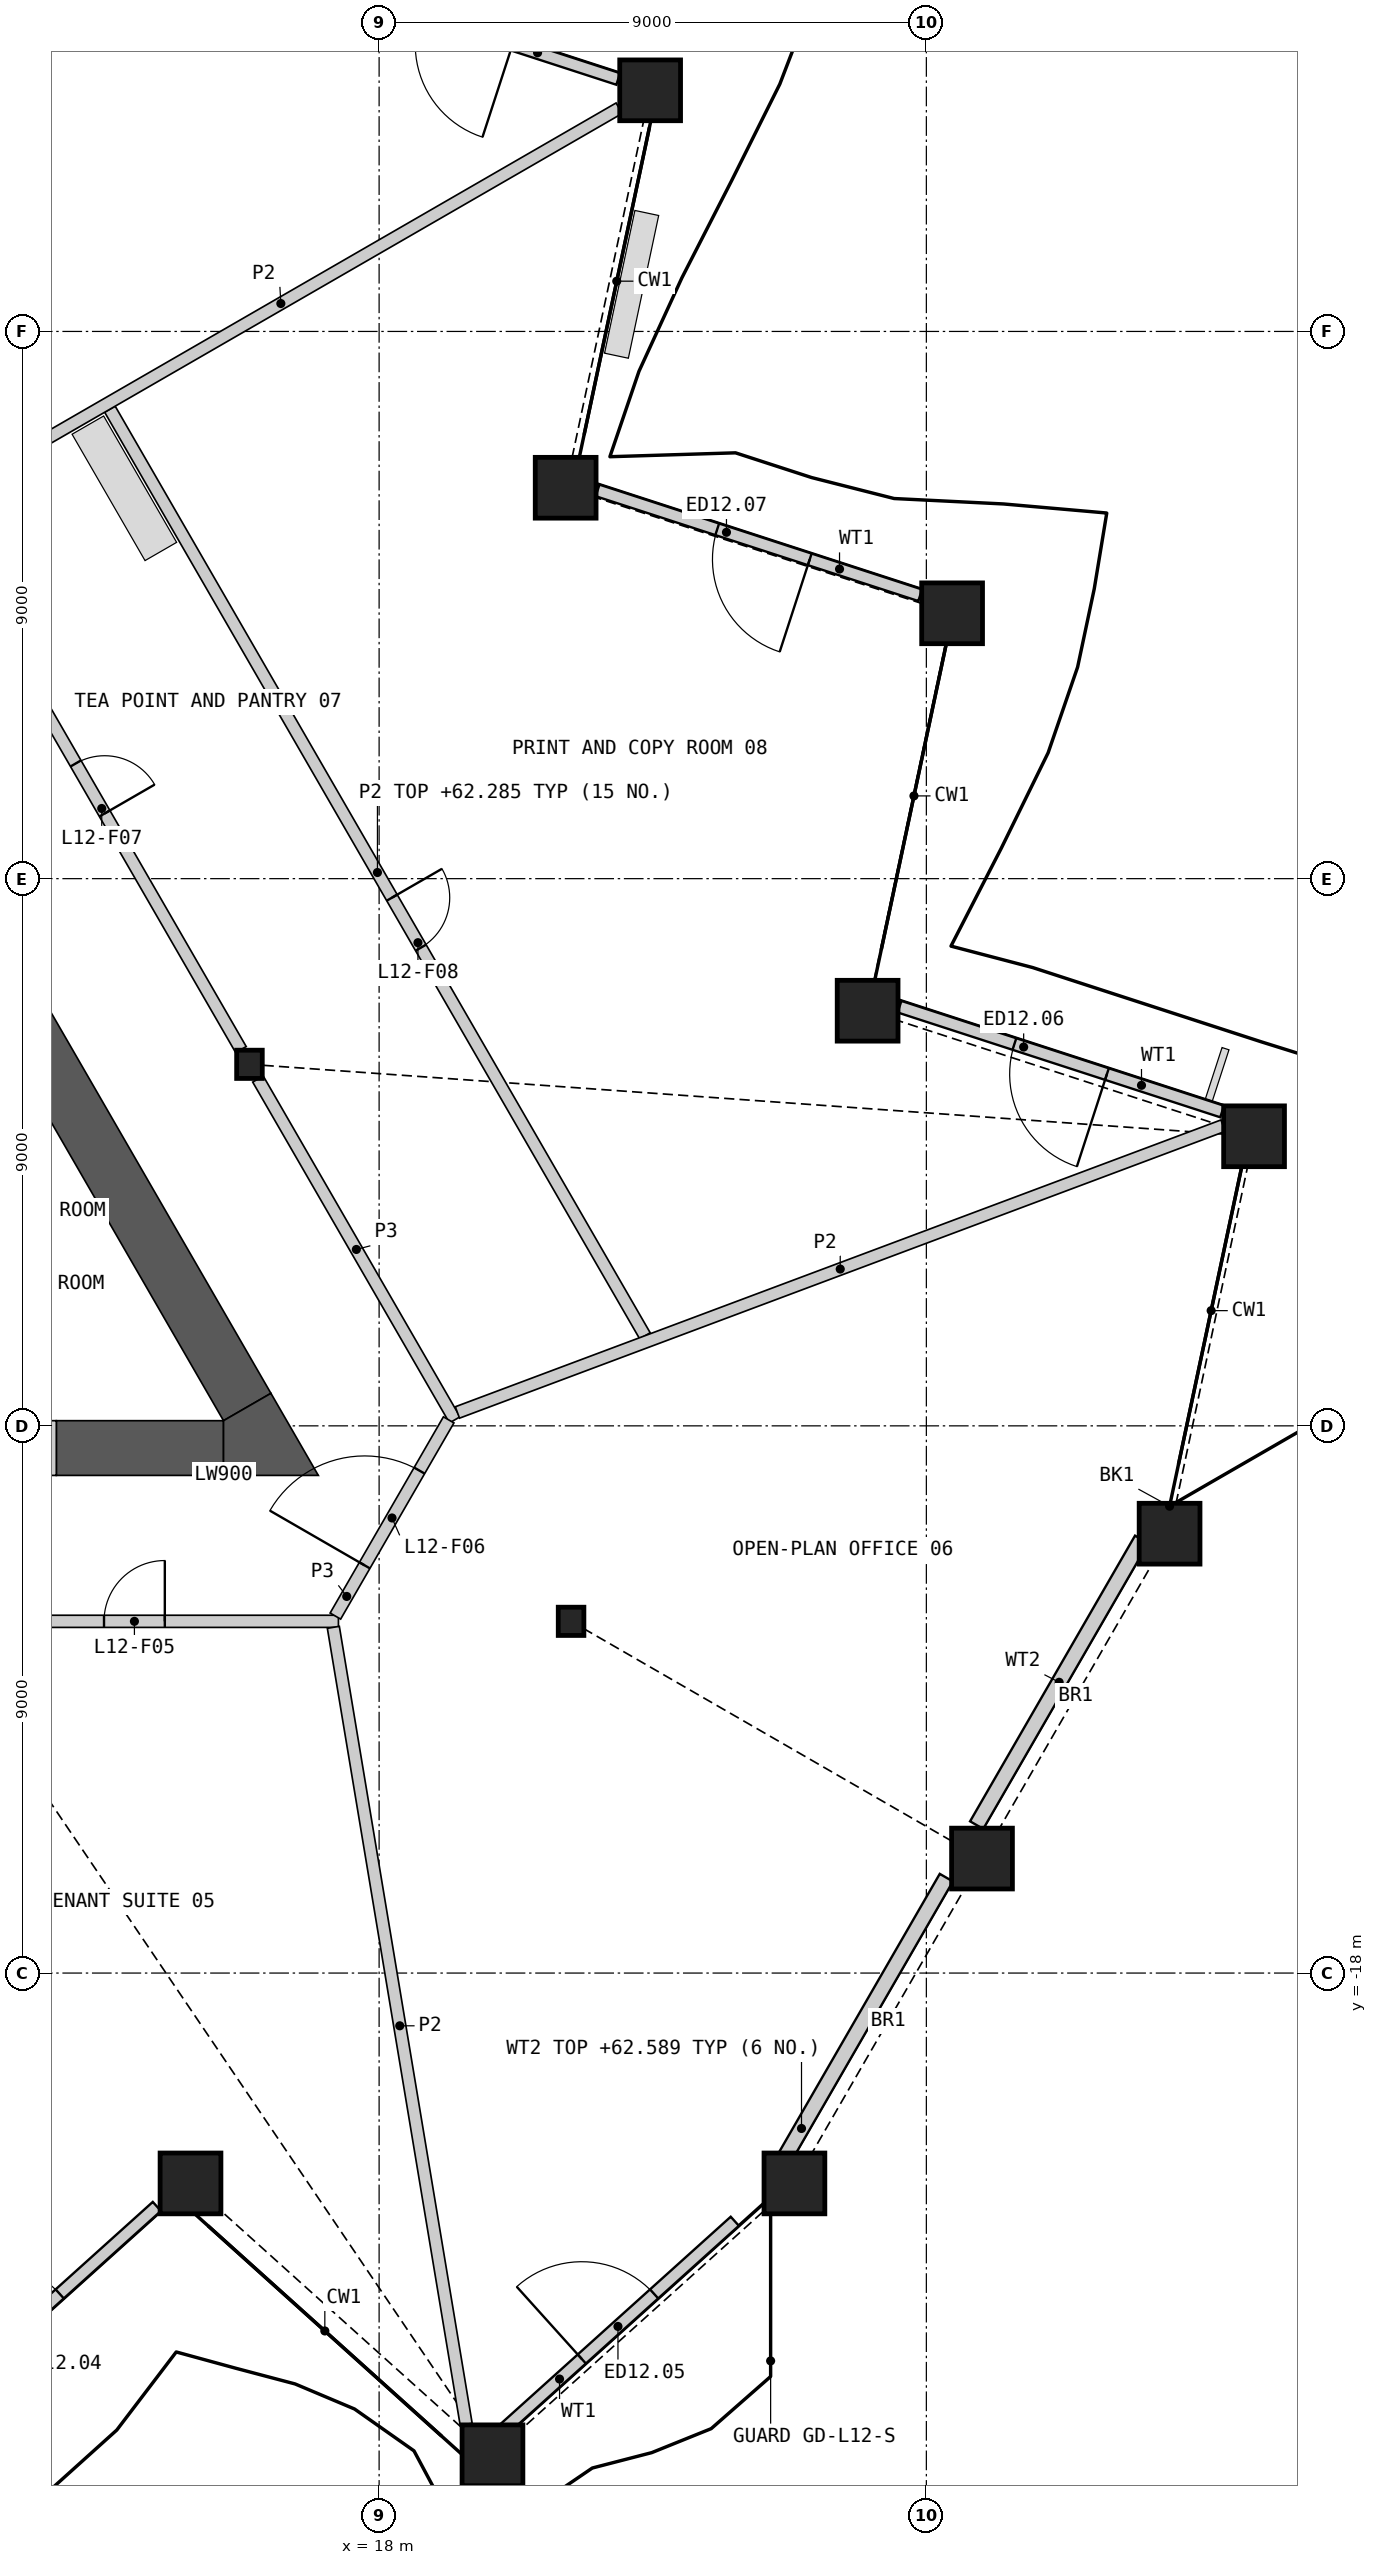
"""IFC4 building model, lengths in metres.
Left out: names, types, materials, properties, quantities, classifications, styles, units other than length and angle.
Written with IfcOpenShell. Run it as: python <this file> out.ifc"""

import sys

from ifc_helpers import new_model, si_unit, direction, frame, frame_2d, origin, origin_2d, place, context, subcontext, project, spatial, polyline, rectangle, hollow_rectangle, i_section, outline, extrude, element, fill, save


model = new_model("IFC4")
c1 = context("Model", 3, precision=1e-05, world=origin(), true_north=direction((0.0, 1.0)))
c2 = subcontext(c1, "Body", "Model", "MODEL_VIEW")
j1 = project(units=[si_unit("LENGTHUNIT", "METRE"), si_unit("PLANEANGLEUNIT", "RADIAN")], contexts=[c1])
p1 = place(None, origin())
s1 = spatial("IfcSite", under=j1, at=p1, CompositionType="ELEMENT")
p2 = place(p1, origin())
s2 = spatial("IfcBuilding", under=s1, at=p2, CompositionType="ELEMENT")
p3 = place(p2, frame((0.0, 0.0, 59.4)))
s3 = spatial("IfcBuildingStorey", under=s2, at=p3, CompositionType="ELEMENT", Elevation=59.4)
for number, where, z_axis, x_axis in (
    (1, (14.898, -21.46, 0.0), (0.0, 0.0, 1.0), (1.0, 0.0, 0.0)),
    (2, (19.864, -25.931, 0.0), (0.0, 0.0, 1.0), (1.0, 0.0, 0.0)),
    (3, (24.83, -21.46, 0.0), (0.0, 0.0, 1.0), (1.0, 0.0, 0.0)),
    (4, (27.915, -16.117, 0.0), (0.0, 0.0, 1.0), (1.0, 0.0, 0.0)),
    (5, (31.0, -10.774, 0.0), (0.0, 0.0, 1.0), (1.0, 0.0, 0.0)),
    (6, (32.389, -4.237, 0.0), (0.0, 0.0, 1.0), (1.0, 0.0, 0.0)),
    (7, (26.034, -2.172, 0.0), (0.0, 0.0, 1.0), (1.0, 0.0, 0.0)),
    (8, (27.423, 4.364, 0.0), (0.0, 0.0, 1.0), (1.0, 0.0, 0.0)),
    (9, (21.068, 6.429, 0.0), (0.0, 0.0, 1.0), (1.0, 0.0, 0.0)),
    (10, (22.457, 12.966, 0.0), (0.0, 0.0, 1.0), (1.0, 0.0, 0.0)),
):
    element("IfcColumn", number, at=place(p3, frame(where, z_axis=z_axis, x_axis=x_axis)), inside=s3, PredefinedType="COLUMN", context=c2, shape_type="SweptSolid", body=[
        extrude(hollow_rectangle(XDim=1.0, YDim=1.0, WallThickness=0.07, at=origin_2d()), origin(), (0.0, 0.0, 1.0), 4.2),
    ])
for number, where, z_axis, x_axis in (
    (11, (21.157, -12.215, 0.0), (0.0, 0.0, 1.0), (1.0, 0.0, 0.0)),
    (12, (15.868, -3.054, 0.0), (0.0, 0.0, 1.0), (1.0, 0.0, 0.0)),
):
    element("IfcColumn", number, at=place(p3, frame(where, z_axis=z_axis, x_axis=x_axis)), inside=s3, PredefinedType="COLUMN", context=c2, shape_type="SweptSolid", body=[
        extrude(i_section(OverallWidth=0.421, OverallDepth=0.465, WebThickness=0.045, FlangeThickness=0.072, at=origin_2d()), origin(), (0.0, 0.0, 1.0), 4.2),
    ])
p4 = place(p3, frame((10.231, -25.542, 0.0), z_axis=(0.0, 0.0, 1.0), x_axis=(0.743162549077, 0.669110921783, 0.0)))
e13 = element("IfcWall", 13, at=p4, inside=s3, PredefinedType="SOLIDWALL", context=c2, shape_type="SweptSolid", body=[
    extrude(rectangle(XDim=5.535, YDim=0.2, at=frame_2d((2.768, 0.0))), origin(), (0.0, 0.0, 1.0), 3.189),
])
p5 = place(p4, frame((1.786, 0.0, 0.0)))
e14 = element("IfcOpeningElement", 14, at=p5, cuts=e13, PredefinedType="OPENING", context=c2, shape_type="SweptSolid", body=[
    extrude(rectangle(XDim=1.6, YDim=2.4, at=frame_2d((0.8, 1.2))), frame((0.0, 0.11, 0.0), z_axis=(0.0, -1.0, 0.0), x_axis=(1.0, 0.0, 0.0)), (0.0, 0.0, 1.0), 0.22),
])
p6 = place(p3, frame((20.007, -25.542, 0.0), z_axis=(0.0, 0.0, 1.0), x_axis=(0.743150930715, 0.669123825743, 0.0)))
e15 = element("IfcWall", 15, at=p6, inside=s3, PredefinedType="SOLIDWALL", context=c2, shape_type="SweptSolid", body=[
    extrude(rectangle(XDim=5.171, YDim=0.2, at=frame_2d((2.585, 0.0))), origin(), (0.0, 0.0, 1.0), 3.189),
])
p7 = place(p6, frame((1.786, 0.0, 0.0)))
e16 = element("IfcOpeningElement", 16, at=p7, cuts=e15, PredefinedType="OPENING", context=c2, shape_type="SweptSolid", body=[
    extrude(rectangle(XDim=1.6, YDim=2.4, at=frame_2d((0.8, 1.2))), frame((0.0, 0.11, 0.0), z_axis=(0.0, -1.0, 0.0), x_axis=(1.0, 0.0, 0.0)), (0.0, 0.0, 1.0), 0.22),
])
p8 = place(p3, frame((24.682, -21.015, 0.0), z_axis=(0.0, 0.0, 1.0), x_axis=(0.500008603535, 0.866020436474, 0.0)))
e17 = element("IfcWall", 17, at=p8, inside=s3, PredefinedType="SOLIDWALL", context=c2, shape_type="SweptSolid", body=[
    extrude(rectangle(XDim=5.293, YDim=0.25, at=frame_2d((2.646, 0.0))), origin(), (0.0, 0.0, 1.0), 3.189),
])
p9 = place(p3, frame((27.827, -15.567, 0.0), z_axis=(0.0, 0.0, 1.0), x_axis=(0.499991204533, 0.86603048179, 0.0)))
e18 = element("IfcWall", 18, at=p9, inside=s3, PredefinedType="SOLIDWALL", context=c2, shape_type="SweptSolid", body=[
    extrude(rectangle(XDim=5.426, YDim=0.25, at=frame_2d((2.713, 0.0))), origin(), (0.0, 0.0, 1.0), 3.189),
])
p10 = place(p3, frame((31.865, -3.83, 0.0), z_axis=(0.0, 0.0, 1.0), x_axis=(-0.951054004345, 0.309024725255, 0.0)))
e19 = element("IfcWall", 19, at=p10, inside=s3, PredefinedType="SOLIDWALL", context=c2, shape_type="SweptSolid", body=[
    extrude(rectangle(XDim=5.579, YDim=0.2, at=frame_2d((2.79, 0.0))), origin(), (0.0, 0.0, 1.0), 3.189),
])
p11 = place(p10, frame((1.992, 0.0, 0.0)))
e20 = element("IfcOpeningElement", 20, at=p11, cuts=e19, PredefinedType="OPENING", context=c2, shape_type="SweptSolid", body=[
    extrude(rectangle(XDim=1.6, YDim=2.4, at=frame_2d((0.8, 1.2))), frame((0.0, 0.11, 0.0), z_axis=(0.0, -1.0, 0.0), x_axis=(1.0, 0.0, 0.0)), (0.0, 0.0, 1.0), 0.22),
])
p12 = place(p3, frame((26.899, 4.661, 0.0), z_axis=(0.0, 0.0, 1.0), x_axis=(-0.951054004345, 0.309024725255, 0.0)))
e21 = element("IfcWall", 21, at=p12, inside=s3, PredefinedType="SOLIDWALL", context=c2, shape_type="SweptSolid", body=[
    extrude(rectangle(XDim=5.579, YDim=0.2, at=frame_2d((2.79, 0.0))), origin(), (0.0, 0.0, 1.0), 3.189),
])
p13 = place(p12, frame((1.91, 0.0, 0.0)))
e22 = element("IfcOpeningElement", 22, at=p13, cuts=e21, PredefinedType="OPENING", context=c2, shape_type="SweptSolid", body=[
    extrude(rectangle(XDim=1.6, YDim=2.4, at=frame_2d((0.8, 1.2))), frame((0.0, 0.11, 0.0), z_axis=(0.0, -1.0, 0.0), x_axis=(1.0, 0.0, 0.0)), (0.0, 0.0, 1.0), 0.22),
])
p14 = place(p3, frame((21.933, 13.153, 0.0), z_axis=(0.0, 0.0, 1.0), x_axis=(-0.951066864375, 0.308985144444, 0.0)))
e23 = element("IfcWall", 23, at=p14, inside=s3, PredefinedType="SOLIDWALL", context=c2, shape_type="SweptSolid", body=[
    extrude(rectangle(XDim=5.579, YDim=0.2, at=frame_2d((2.79, 0.0))), origin(), (0.0, 0.0, 1.0), 3.189),
])
p15 = place(p14, frame((1.828, 0.0, 0.0)))
e24 = element("IfcOpeningElement", 24, at=p15, cuts=e23, PredefinedType="OPENING", context=c2, shape_type="SweptSolid", body=[
    extrude(rectangle(XDim=1.6, YDim=2.4, at=frame_2d((0.8, 1.2))), frame((0.0, 0.11, 0.0), z_axis=(0.0, -1.0, 0.0), x_axis=(1.0, 0.0, 0.0)), (0.0, 0.0, 1.0), 0.22),
])
p16 = place(p3, frame((12.691, -9.365, 0.0), z_axis=(0.0, 0.0, 1.0), x_axis=(1.0, 0.0, 0.0)))
e25 = element("IfcWall", 25, at=p16, inside=s3, PredefinedType="SHEAR", context=c2, shape_type="SweptSolid", body=[
    extrude(rectangle(XDim=2.75, YDim=0.9, at=frame_2d((1.375, 0.0))), origin(), (0.0, 0.0, 1.0), 3.8),
])
p17 = place(p3, frame((15.831, -8.69, 0.0), z_axis=(0.0, 0.0, 1.0), x_axis=(-0.499995435471, 0.8660280391, 0.0)))
e26 = element("IfcWall", 26, at=p17, inside=s3, PredefinedType="SHEAR", context=c2, shape_type="SweptSolid", body=[
    extrude(rectangle(XDim=8.232, YDim=0.9, at=frame_2d((4.116, 0.0))), origin(), (0.0, 0.0, 1.0), 3.8),
])
p18 = place(p3, origin())
e27 = element("IfcWall", 27, at=p18, inside=s3, PredefinedType="SHEAR", context=c2, shape_type="SweptSolid", body=[
    extrude(outline(polyline([(15.441, -9.815), (15.441, -8.915), (16.221, -8.465), (17.0, -9.815), (15.441, -9.815)])), origin(), (0.0, 0.0, 1.0), 3.8),
])
p19 = place(p3, frame((10.491, -9.365, 0.0), z_axis=(0.0, 0.0, 1.0), x_axis=(1.0, 0.0, 0.0)))
e28 = element("IfcWall", 28, at=p19, inside=s3, PredefinedType="SHEAR", context=c2, shape_type="SweptSolid", body=[
    extrude(rectangle(XDim=2.2, YDim=0.9, at=frame_2d((1.1, 0.0))), origin(), (0.0, 0.0, 1.0), 3.8),
])
p20 = place(p19, frame((0.6, 0.0, 0.0)))
e29 = element("IfcOpeningElement", 29, at=p20, cuts=e28, PredefinedType="OPENING", context=c2, shape_type="SweptSolid", body=[
    extrude(rectangle(XDim=1.0, YDim=2.1, at=frame_2d((0.5, 1.05))), frame((0.0, 0.46, 0.0), z_axis=(0.0, -1.0, 0.0), x_axis=(1.0, 0.0, 0.0)), (0.0, 0.0, 1.0), 0.92),
])
p21 = place(p3, frame((10.719, 5.865, 0.0), z_axis=(0.0, 0.0, 1.0), x_axis=(0.49999175339, -0.866030164915, 0.0)))
e30 = element("IfcWall", 30, at=p21, inside=s3, PredefinedType="PARTITIONING", context=c2, shape_type="SweptSolid", body=[
    extrude(rectangle(XDim=10.019, YDim=0.2, at=frame_2d((5.009, 0.0))), origin(), (0.0, 0.0, 1.0), 3.8),
])
p22 = place(p21, frame((4.585, 0.0, 0.0)))
e31 = element("IfcOpeningElement", 31, at=p22, cuts=e30, PredefinedType="OPENING", context=c2, shape_type="SweptSolid", body=[
    extrude(rectangle(XDim=0.95, YDim=2.1, at=frame_2d((0.475, 1.05))), frame((0.0, 0.11, 0.0), z_axis=(0.0, -1.0, 0.0), x_axis=(1.0, 0.0, 0.0)), (0.0, 0.0, 1.0), 0.22),
])
p23 = place(p3, frame((10.821, -12.215, 0.0), z_axis=(0.0, 0.0, 1.0), x_axis=(1.0, 0.0, 0.0)))
e32 = element("IfcWall", 32, at=p23, inside=s3, PredefinedType="PARTITIONING", context=c2, shape_type="SweptSolid", body=[
    extrude(rectangle(XDim=6.51, YDim=0.2, at=frame_2d((3.255, 0.0))), origin(), (0.0, 0.0, 1.0), 3.8),
])
p24 = place(p23, frame((2.655, 0.0, 0.0)))
e33 = element("IfcOpeningElement", 33, at=p24, cuts=e32, PredefinedType="OPENING", context=c2, shape_type="SweptSolid", body=[
    extrude(rectangle(XDim=1.0, YDim=2.1, at=frame_2d((0.5, 1.05))), frame((0.0, 0.11, 0.0), z_axis=(0.0, -1.0, 0.0), x_axis=(1.0, 0.0, 0.0)), (0.0, 0.0, 1.0), 0.22),
])
p25 = place(p3, frame((16.008, -3.296, 0.0), z_axis=(0.0, 0.0, 1.0), x_axis=(0.499984737558, -0.86603421538, 0.0)))
e34 = element("IfcWall", 34, at=p25, inside=s3, PredefinedType="PARTITIONING", context=c2, shape_type="SweptSolid", body=[
    extrude(rectangle(XDim=6.473, YDim=0.2, at=frame_2d((3.236, 0.0))), origin(), (0.0, 0.0, 1.0), 3.8),
])
p26 = place(p3, frame((17.281, -12.128, 0.0), z_axis=(0.0, 0.0, 1.0), x_axis=(0.499958791762, 0.866049194065, 0.0)))
e35 = element("IfcWall", 35, at=p26, inside=s3, PredefinedType="PARTITIONING", context=c2, shape_type="SweptSolid", body=[
    extrude(rectangle(XDim=3.726, YDim=0.2, at=frame_2d((1.863, 0.0))), origin(), (0.0, 0.0, 1.0), 3.8),
])
p27 = place(p26, frame((0.963, 0.0, 0.0)))
e36 = element("IfcOpeningElement", 36, at=p27, cuts=e35, PredefinedType="OPENING", context=c2, shape_type="SweptSolid", body=[
    extrude(rectangle(XDim=1.8, YDim=2.1, at=frame_2d((0.9, 1.05))), frame((0.0, 0.11, 0.0), z_axis=(0.0, -1.0, 0.0), x_axis=(1.0, 0.0, 0.0)), (0.0, 0.0, 1.0), 0.22),
])
p28 = place(p3, frame((13.573, 7.721, 0.0), z_axis=(0.0, 0.0, 1.0), x_axis=(0.499990262232, -0.866031025814, 0.0)))
e37 = element("IfcWall", 37, at=p28, inside=s3, PredefinedType="PARTITIONING", context=c2, shape_type="SweptSolid", body=[
    extrude(rectangle(XDim=17.597, YDim=0.2, at=frame_2d((8.799, 0.0))), origin(), (0.0, 0.0, 1.0), 2.885),
])
p29 = place(p28, frame((9.277, 0.0, 0.0)))
e38 = element("IfcOpeningElement", 38, at=p29, cuts=e37, PredefinedType="OPENING", context=c2, shape_type="SweptSolid", body=[
    extrude(rectangle(XDim=0.95, YDim=2.1, at=frame_2d((0.475, 1.05))), frame((0.0, 0.11, 0.0), z_axis=(0.0, -1.0, 0.0), x_axis=(1.0, 0.0, 0.0)), (0.0, 0.0, 1.0), 0.22),
])
p30 = place(p3, frame((19.288, -8.78, 0.0), z_axis=(0.0, 0.0, 1.0), x_axis=(0.93644254502, 0.350820979814, 0.0)))
e39 = element("IfcWall", 39, at=p30, inside=s3, PredefinedType="PARTITIONING", context=c2, shape_type="SweptSolid", body=[
    extrude(rectangle(XDim=13.447, YDim=0.2, at=frame_2d((6.723, 0.0))), origin(), (0.0, 0.0, 1.0), 2.885),
])
p31 = place(p3, frame((17.247, -12.314, 0.0), z_axis=(0.0, 0.0, 1.0), x_axis=(0.164396008001, -0.986394420378, 0.0)))
e40 = element("IfcWall", 40, at=p31, inside=s3, PredefinedType="PARTITIONING", context=c2, shape_type="SweptSolid", body=[
    extrude(rectangle(XDim=13.289, YDim=0.2, at=frame_2d((6.644, 0.0))), origin(), (0.0, 0.0, 1.0), 2.885),
])
p32 = place(p3, frame((10.821, 6.247, 0.0), z_axis=(0.0, 0.0, 1.0), x_axis=(0.866026729935, 0.499997703033, 0.0)))
e41 = element("IfcWall", 41, at=p32, inside=s3, PredefinedType="PARTITIONING", context=c2, shape_type="SweptSolid", body=[
    extrude(rectangle(XDim=12.848, YDim=0.2, at=frame_2d((6.424, 0.0))), origin(), (0.0, 0.0, 1.0), 2.885),
])
p33 = place(p5, origin())
e42 = element("IfcDoor", 42, at=p33, inside=s3, OperationType="DOUBLE_DOOR_SINGLE_SWING", PredefinedType="DOOR", context=c2, shape_type="SweptSolid", body=[
    extrude(rectangle(XDim=1.6, YDim=2.4, at=frame_2d((0.8, 1.2))), frame((0.0, 0.025, 0.0), z_axis=(0.0, -1.0, 0.0), x_axis=(1.0, 0.0, 0.0)), (0.0, 0.0, 1.0), 0.05),
])
fill(e14, e42)
p34 = place(p7, origin())
e43 = element("IfcDoor", 43, at=p34, inside=s3, OperationType="DOUBLE_DOOR_SINGLE_SWING", PredefinedType="DOOR", context=c2, shape_type="SweptSolid", body=[
    extrude(rectangle(XDim=1.6, YDim=2.4, at=frame_2d((0.8, 1.2))), frame((0.0, 0.025, 0.0), z_axis=(0.0, -1.0, 0.0), x_axis=(1.0, 0.0, 0.0)), (0.0, 0.0, 1.0), 0.05),
])
fill(e16, e43)
p35 = place(p11, origin())
e44 = element("IfcDoor", 44, at=p35, inside=s3, OperationType="DOUBLE_DOOR_SINGLE_SWING", PredefinedType="DOOR", context=c2, shape_type="SweptSolid", body=[
    extrude(rectangle(XDim=1.6, YDim=2.4, at=frame_2d((0.8, 1.2))), frame((0.0, 0.025, 0.0), z_axis=(0.0, -1.0, 0.0), x_axis=(1.0, 0.0, 0.0)), (0.0, 0.0, 1.0), 0.05),
])
fill(e20, e44)
p36 = place(p13, origin())
e45 = element("IfcDoor", 45, at=p36, inside=s3, OperationType="DOUBLE_DOOR_SINGLE_SWING", PredefinedType="DOOR", context=c2, shape_type="SweptSolid", body=[
    extrude(rectangle(XDim=1.6, YDim=2.4, at=frame_2d((0.8, 1.2))), frame((0.0, 0.025, 0.0), z_axis=(0.0, -1.0, 0.0), x_axis=(1.0, 0.0, 0.0)), (0.0, 0.0, 1.0), 0.05),
])
fill(e22, e45)
p37 = place(p24, origin())
e46 = element("IfcDoor", 46, at=p37, inside=s3, OperationType="SINGLE_SWING_RIGHT", PredefinedType="DOOR", context=c2, shape_type="SweptSolid", body=[
    extrude(rectangle(XDim=1.0, YDim=2.1, at=frame_2d((0.5, 1.05))), frame((0.0, 0.025, 0.0), z_axis=(0.0, -1.0, 0.0), x_axis=(1.0, 0.0, 0.0)), (0.0, 0.0, 1.0), 0.05),
])
fill(e33, e46)
p38 = place(p27, origin())
e47 = element("IfcDoor", 47, at=p38, inside=s3, OperationType="DOUBLE_DOOR_SINGLE_SWING", PredefinedType="DOOR", context=c2, shape_type="SweptSolid", body=[
    extrude(rectangle(XDim=1.8, YDim=2.1, at=frame_2d((0.9, 1.05))), frame((0.0, 0.025, 0.0), z_axis=(0.0, -1.0, 0.0), x_axis=(1.0, 0.0, 0.0)), (0.0, 0.0, 1.0), 0.05),
])
fill(e36, e47)
p39 = place(p22, origin())
e48 = element("IfcDoor", 48, at=p39, inside=s3, OperationType="SINGLE_SWING_RIGHT", PredefinedType="DOOR", context=c2, shape_type="SweptSolid", body=[
    extrude(rectangle(XDim=0.95, YDim=2.1, at=frame_2d((0.475, 1.05))), frame((0.0, 0.025, 0.0), z_axis=(0.0, -1.0, 0.0), x_axis=(1.0, 0.0, 0.0)), (0.0, 0.0, 1.0), 0.05),
])
fill(e31, e48)
p40 = place(p29, origin())
e49 = element("IfcDoor", 49, at=p40, inside=s3, OperationType="SINGLE_SWING_LEFT", PredefinedType="DOOR", context=c2, shape_type="SweptSolid", body=[
    extrude(rectangle(XDim=0.95, YDim=2.1, at=frame_2d((0.475, 1.05))), frame((0.0, 0.025, 0.0), z_axis=(0.0, -1.0, 0.0), x_axis=(1.0, 0.0, 0.0)), (0.0, 0.0, 1.0), 0.05),
])
fill(e38, e49)
save(model, sys.argv[1])
